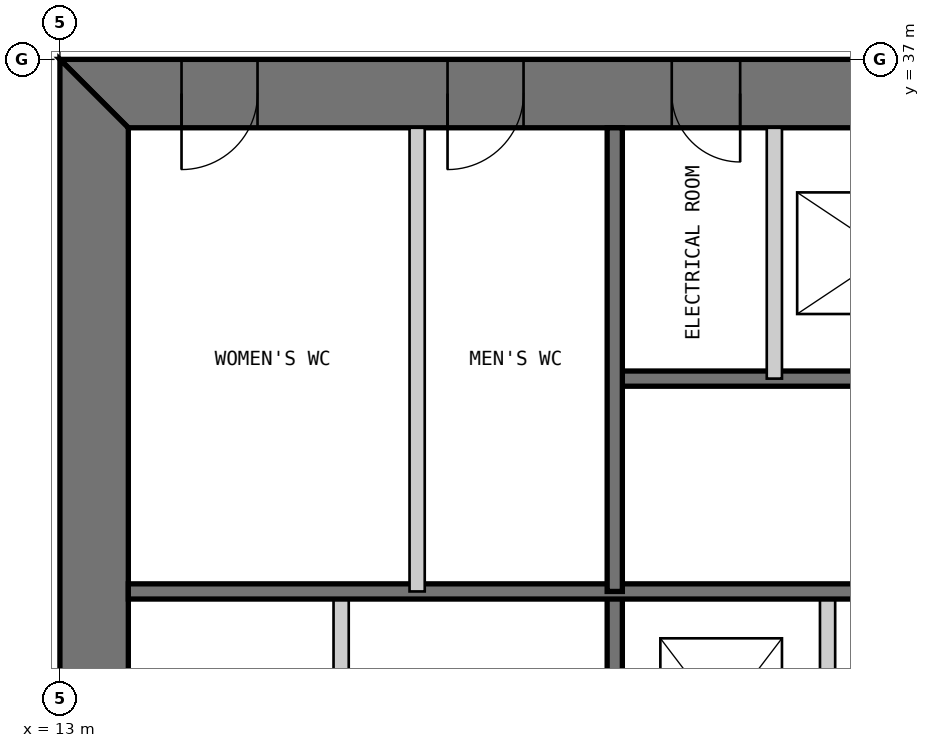
"""IFC4 building model, lengths in metres.
Left out: names, types, materials, properties, quantities, classifications, styles, units other than length and angle.
Written with IfcOpenShell. Run it as: python <this file> out.ifc"""

import sys

from ifc_helpers import new_model, si_unit, direction, frame, frame_2d, origin, place, context, subcontext, project, spatial, polyline, rectangle, outline, extrude, element, fill, save


model = new_model("IFC4")
c1 = context("Model", 3, precision=1e-05, world=origin(), true_north=direction((0.0, 1.0)))
c2 = subcontext(c1, "Body", "Model", "MODEL_VIEW")
j1 = project(units=[si_unit("LENGTHUNIT", "METRE"), si_unit("PLANEANGLEUNIT", "RADIAN")], contexts=[c1])
p1 = place(None, origin())
s1 = spatial("IfcSite", under=j1, at=p1, CompositionType="ELEMENT")
p2 = place(p1, origin())
s2 = spatial("IfcBuilding", under=s1, at=p2, CompositionType="ELEMENT")
p3 = place(p2, frame((0.0, 0.0, 138.4)))
s3 = spatial("IfcBuildingStorey", under=s2, at=p3, CompositionType="ELEMENT", Elevation=138.4)
p4 = place(p3, frame((37.0, 36.55, 0.0), z_axis=(0.0, 0.0, 1.0), x_axis=(-1.0, 0.0, 0.0)))
e1 = element("IfcWall", 1, at=p4, inside=s3, PredefinedType="SHEAR", context=c2, shape_type="SweptSolid", body=[
    extrude(outline(polyline([(0.0, -0.45), (24.0, -0.45), (23.1, 0.45), (0.9, 0.45), (0.0, -0.45)])), origin(), (0.0, 0.0, 1.0), 4.0),
])
p5 = place(p4, frame((4.9, 0.0, 0.0)))
e2 = element("IfcOpeningElement", 2, at=p5, cuts=e1, PredefinedType="OPENING", context=c2, shape_type="SweptSolid", body=[
    extrude(rectangle(XDim=1.0, YDim=2.2, at=frame_2d((0.5, 1.1))), frame((0.0, 0.46, 0.0), z_axis=(0.0, -1.0, 0.0), x_axis=(1.0, 0.0, 0.0)), (0.0, 0.0, 1.0), 0.92),
])
p6 = place(p4, frame((8.9, 0.0, 0.0)))
e3 = element("IfcOpeningElement", 3, at=p6, cuts=e1, PredefinedType="OPENING", context=c2, shape_type="SweptSolid", body=[
    extrude(rectangle(XDim=1.1, YDim=2.2, at=frame_2d((0.55, 1.1))), frame((0.0, 0.46, 0.0), z_axis=(0.0, -1.0, 0.0), x_axis=(1.0, 0.0, 0.0)), (0.0, 0.0, 1.0), 0.92),
])
p7 = place(p4, frame((15.05, 0.0, 0.0)))
e4 = element("IfcOpeningElement", 4, at=p7, cuts=e1, PredefinedType="OPENING", context=c2, shape_type="SweptSolid", body=[
    extrude(rectangle(XDim=0.9, YDim=2.2, at=frame_2d((0.45, 1.1))), frame((0.0, 0.46, 0.0), z_axis=(0.0, -1.0, 0.0), x_axis=(1.0, 0.0, 0.0)), (0.0, 0.0, 1.0), 0.92),
])
p8 = place(p4, frame((17.9, 0.0, 0.0)))
e5 = element("IfcOpeningElement", 5, at=p8, cuts=e1, PredefinedType="OPENING", context=c2, shape_type="SweptSolid", body=[
    extrude(rectangle(XDim=1.0, YDim=2.2, at=frame_2d((0.5, 1.1))), frame((0.0, 0.46, 0.0), z_axis=(0.0, -1.0, 0.0), x_axis=(1.0, 0.0, 0.0)), (0.0, 0.0, 1.0), 0.92),
])
p9 = place(p4, frame((21.4, 0.0, 0.0)))
e6 = element("IfcOpeningElement", 6, at=p9, cuts=e1, PredefinedType="OPENING", context=c2, shape_type="SweptSolid", body=[
    extrude(rectangle(XDim=1.0, YDim=2.2, at=frame_2d((0.5, 1.1))), frame((0.0, 0.46, 0.0), z_axis=(0.0, -1.0, 0.0), x_axis=(1.0, 0.0, 0.0)), (0.0, 0.0, 1.0), 0.92),
])
p10 = place(p3, frame((13.45, 36.1, 0.0), z_axis=(0.0, 0.0, 1.0), x_axis=(0.0, -1.0, 0.0)))
e7 = element("IfcWall", 7, at=p10, inside=s3, PredefinedType="SHEAR", context=c2, shape_type="SweptSolid", body=[
    extrude(outline(polyline([(-0.9, -0.45), (23.1, -0.45), (22.2, 0.45), (0.0, 0.45), (-0.9, -0.45)])), origin(), (0.0, 0.0, 1.0), 4.0),
])
p11 = place(p10, frame((20.2, 0.0, 0.0)))
e8 = element("IfcOpeningElement", 8, at=p11, cuts=e7, PredefinedType="OPENING", context=c2, shape_type="SweptSolid", body=[
    extrude(rectangle(XDim=1.0, YDim=2.2, at=frame_2d((0.5, 1.1))), frame((0.0, 0.46, 0.0), z_axis=(0.0, -1.0, 0.0), x_axis=(1.0, 0.0, 0.0)), (0.0, 0.0, 1.0), 0.92),
])
p12 = place(p10, frame((17.25, 0.0, 0.0)))
e9 = element("IfcOpeningElement", 9, at=p12, cuts=e7, PredefinedType="OPENING", context=c2, shape_type="SweptSolid", body=[
    extrude(rectangle(XDim=0.9, YDim=2.2, at=frame_2d((0.45, 1.1))), frame((0.0, 0.46, 0.0), z_axis=(0.0, -1.0, 0.0), x_axis=(1.0, 0.0, 0.0)), (0.0, 0.0, 1.0), 0.92),
])
p13 = place(p3, frame((16.7, 13.9, 0.0), z_axis=(0.0, 0.0, 1.0), x_axis=(0.0, 1.0, 0.0)))
e10 = element("IfcWall", 10, at=p13, inside=s3, PredefinedType="PARTITIONING", context=c2, shape_type="SweptSolid", body=[
    extrude(rectangle(XDim=16.1, YDim=0.2, at=frame_2d((8.05, 0.0))), origin(), (0.0, 0.0, 1.0), 3.8),
])
p14 = place(p13, frame((7.4, 0.0, 0.0)))
e11 = element("IfcOpeningElement", 11, at=p14, cuts=e10, PredefinedType="OPENING", context=c2, shape_type="SweptSolid", body=[
    extrude(rectangle(XDim=0.9, YDim=2.2, at=frame_2d((0.45, 1.1))), frame((0.0, 0.11, 0.0), z_axis=(0.0, -1.0, 0.0), x_axis=(1.0, 0.0, 0.0)), (0.0, 0.0, 1.0), 0.22),
])
p15 = place(p13, frame((12.4, 0.0, 0.0)))
e12 = element("IfcOpeningElement", 12, at=p15, cuts=e10, PredefinedType="OPENING", context=c2, shape_type="SweptSolid", body=[
    extrude(rectangle(XDim=0.9, YDim=2.2, at=frame_2d((0.45, 1.1))), frame((0.0, 0.11, 0.0), z_axis=(0.0, -1.0, 0.0), x_axis=(1.0, 0.0, 0.0)), (0.0, 0.0, 1.0), 0.22),
])
p16 = place(p3, frame((20.3, 13.9, 0.0), z_axis=(0.0, 0.0, 1.0), x_axis=(0.0, 1.0, 0.0)))
e13 = element("IfcWall", 13, at=p16, inside=s3, PredefinedType="SOLIDWALL", context=c2, shape_type="SweptSolid", body=[
    extrude(rectangle(XDim=16.1, YDim=0.2, at=frame_2d((8.05, 0.0))), origin(), (0.0, 0.0, 1.0), 3.8),
])
p17 = place(p16, frame((7.217, 0.0, 0.0)))
e14 = element("IfcOpeningElement", 14, at=p17, cuts=e13, PredefinedType="OPENING", context=c2, shape_type="SweptSolid", body=[
    extrude(rectangle(XDim=1.1, YDim=2.2, at=frame_2d((0.55, 1.1))), frame((0.0, 0.11, 0.0), z_axis=(0.0, -1.0, 0.0), x_axis=(1.0, 0.0, 0.0)), (0.0, 0.0, 1.0), 0.22),
])
p18 = place(p16, frame((10.55, 0.0, 0.0)))
e15 = element("IfcOpeningElement", 15, at=p18, cuts=e13, PredefinedType="OPENING", context=c2, shape_type="SweptSolid", body=[
    extrude(rectangle(XDim=1.1, YDim=2.2, at=frame_2d((0.55, 1.1))), frame((0.0, 0.11, 0.0), z_axis=(0.0, -1.0, 0.0), x_axis=(1.0, 0.0, 0.0)), (0.0, 0.0, 1.0), 0.22),
])
p19 = place(p16, frame((13.883, 0.0, 0.0)))
e16 = element("IfcOpeningElement", 16, at=p19, cuts=e13, PredefinedType="OPENING", context=c2, shape_type="SweptSolid", body=[
    extrude(rectangle(XDim=1.1, YDim=2.2, at=frame_2d((0.55, 1.1))), frame((0.0, 0.11, 0.0), z_axis=(0.0, -1.0, 0.0), x_axis=(1.0, 0.0, 0.0)), (0.0, 0.0, 1.0), 0.22),
])
p20 = place(p3, frame((23.1, 20.0, 0.0), z_axis=(0.0, 0.0, 1.0), x_axis=(0.0, 1.0, 0.0)))
e17 = element("IfcWall", 17, at=p20, inside=s3, PredefinedType="PARTITIONING", context=c2, shape_type="SweptSolid", body=[
    extrude(rectangle(XDim=10.0, YDim=0.2, at=frame_2d((5.0, 0.0))), origin(), (0.0, 0.0, 1.0), 3.8),
])
p21 = place(p3, frame((29.7, 32.8, 0.0), z_axis=(0.0, 0.0, 1.0), x_axis=(-1.0, 0.0, 0.0)))
e18 = element("IfcWall", 18, at=p21, inside=s3, PredefinedType="SOLIDWALL", context=c2, shape_type="SweptSolid", body=[
    extrude(rectangle(XDim=9.4, YDim=0.2, at=frame_2d((4.7, 0.0))), origin(), (0.0, 0.0, 1.0), 3.8),
])
p22 = place(p21, frame((0.25, 0.0, 0.0)))
e19 = element("IfcOpeningElement", 19, at=p22, cuts=e18, PredefinedType="OPENING", context=c2, shape_type="SweptSolid", body=[
    extrude(rectangle(XDim=1.0, YDim=2.2, at=frame_2d((0.5, 1.1))), frame((0.0, 0.11, 0.0), z_axis=(0.0, -1.0, 0.0), x_axis=(1.0, 0.0, 0.0)), (0.0, 0.0, 1.0), 0.22),
])
p23 = place(p3, frame((29.7, 30.0, 0.0), z_axis=(0.0, 0.0, 1.0), x_axis=(-1.0, 0.0, 0.0)))
e20 = element("IfcWall", 20, at=p23, inside=s3, PredefinedType="SOLIDWALL", context=c2, shape_type="SweptSolid", body=[
    extrude(rectangle(XDim=15.8, YDim=0.2, at=frame_2d((7.9, 0.0))), origin(), (0.0, 0.0, 1.0), 3.8),
])
p24 = place(p3, frame((22.4, 36.1, 0.0), z_axis=(0.0, 0.0, 1.0), x_axis=(0.0, -1.0, 0.0)))
e21 = element("IfcWall", 21, at=p24, inside=s3, PredefinedType="PARTITIONING", context=c2, shape_type="SweptSolid", body=[
    extrude(rectangle(XDim=3.3, YDim=0.2, at=frame_2d((1.65, 0.0))), origin(), (0.0, 0.0, 1.0), 3.8),
])
p25 = place(p3, frame((20.3, 36.1, 0.0), z_axis=(0.0, 0.0, 1.0), x_axis=(0.0, -1.0, 0.0)))
e22 = element("IfcWall", 22, at=p25, inside=s3, PredefinedType="SOLIDWALL", context=c2, shape_type="SweptSolid", body=[
    extrude(rectangle(XDim=6.1, YDim=0.2, at=frame_2d((3.05, 0.0))), origin(), (0.0, 0.0, 1.0), 3.8),
])
p26 = place(p3, frame((17.7, 36.1, 0.0), z_axis=(0.0, 0.0, 1.0), x_axis=(0.0, -1.0, 0.0)))
e23 = element("IfcWall", 23, at=p26, inside=s3, PredefinedType="PARTITIONING", context=c2, shape_type="SweptSolid", body=[
    extrude(rectangle(XDim=6.1, YDim=0.2, at=frame_2d((3.05, 0.0))), origin(), (0.0, 0.0, 1.0), 3.8),
])
p27 = place(p7, origin())
e24 = element("IfcDoor", 24, at=p27, inside=s3, OperationType="SINGLE_SWING_LEFT", PredefinedType="DOOR", context=c2, shape_type="SweptSolid", body=[
    extrude(rectangle(XDim=0.9, YDim=2.2, at=frame_2d((0.45, 1.1))), frame((0.0, 0.025, 0.0), z_axis=(0.0, -1.0, 0.0), x_axis=(1.0, 0.0, 0.0)), (0.0, 0.0, 1.0), 0.05),
    extrude(outline(polyline([(0.0, 0.0), (0.04, 0.0), (0.04, 2.16), (0.86, 2.16), (0.86, 0.0), (0.9, 0.0), (0.9, 2.2), (0.0, 2.2), (0.0, 0.0)])), frame((0.0, 0.3, 0.0), z_axis=(0.0, -1.0, 0.0), x_axis=(1.0, 0.0, 0.0)), (0.0, 0.0, 1.0), 0.6),
])
fill(e4, e24)
p28 = place(p8, origin())
e25 = element("IfcDoor", 25, at=p28, inside=s3, OperationType="SINGLE_SWING_RIGHT", PredefinedType="DOOR", context=c2, shape_type="SweptSolid", body=[
    extrude(rectangle(XDim=1.0, YDim=2.2, at=frame_2d((0.5, 1.1))), frame((0.0, 0.025, 0.0), z_axis=(0.0, -1.0, 0.0), x_axis=(1.0, 0.0, 0.0)), (0.0, 0.0, 1.0), 0.05),
    extrude(outline(polyline([(0.0, 0.0), (0.04, 0.0), (0.04, 2.16), (0.96, 2.16), (0.96, 0.0), (1.0, 0.0), (1.0, 2.2), (0.0, 2.2), (0.0, 0.0)])), frame((0.0, 0.3, 0.0), z_axis=(0.0, -1.0, 0.0), x_axis=(1.0, 0.0, 0.0)), (0.0, 0.0, 1.0), 0.6),
])
fill(e5, e25)
p29 = place(p9, origin())
e26 = element("IfcDoor", 26, at=p29, inside=s3, OperationType="SINGLE_SWING_RIGHT", PredefinedType="DOOR", context=c2, shape_type="SweptSolid", body=[
    extrude(rectangle(XDim=1.0, YDim=2.2, at=frame_2d((0.5, 1.1))), frame((0.0, 0.025, 0.0), z_axis=(0.0, -1.0, 0.0), x_axis=(1.0, 0.0, 0.0)), (0.0, 0.0, 1.0), 0.05),
    extrude(outline(polyline([(0.0, 0.0), (0.04, 0.0), (0.04, 2.16), (0.96, 2.16), (0.96, 0.0), (1.0, 0.0), (1.0, 2.2), (0.0, 2.2), (0.0, 0.0)])), frame((0.0, 0.3, 0.0), z_axis=(0.0, -1.0, 0.0), x_axis=(1.0, 0.0, 0.0)), (0.0, 0.0, 1.0), 0.6),
])
fill(e6, e26)
save(model, sys.argv[1])
